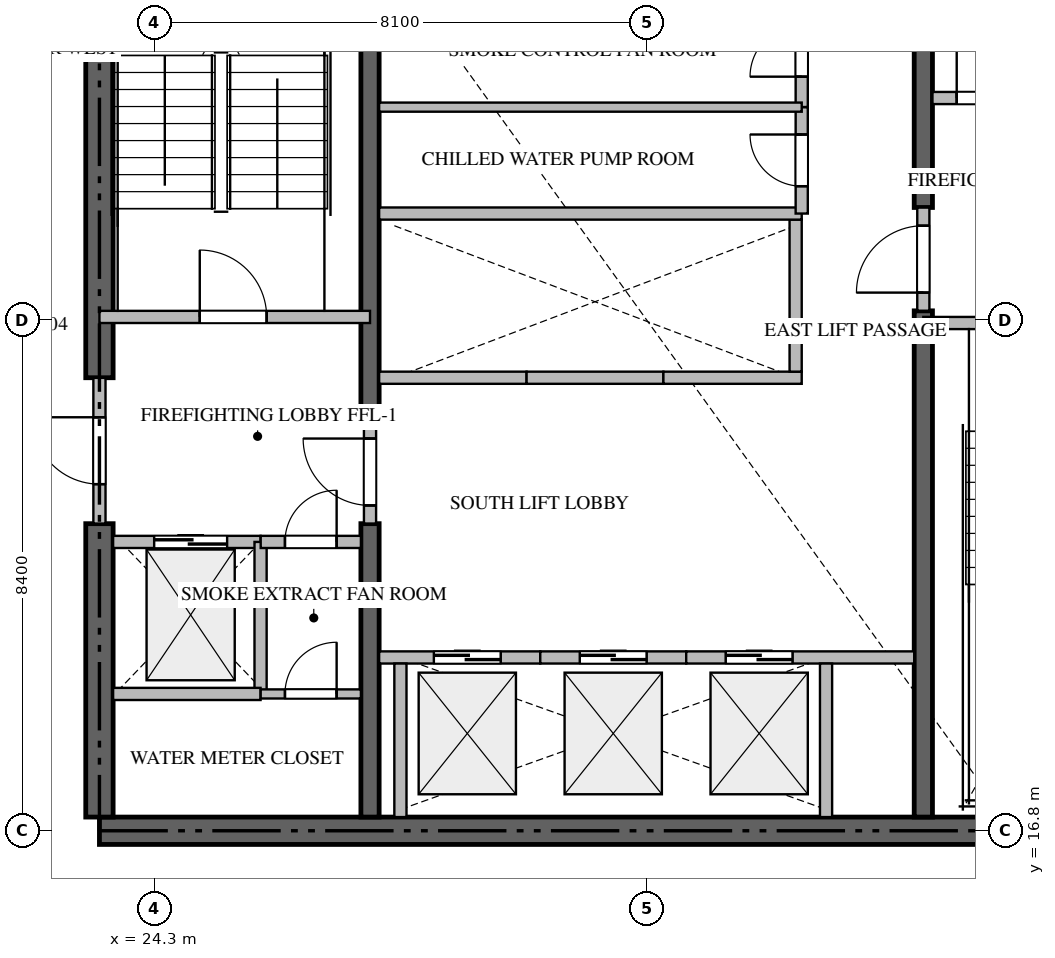
"""IFC4 building model, lengths in metres.
Left out: names, types, materials, properties, quantities, classifications, styles, units other than length and angle.
Written with IfcOpenShell. Run it as: python <this file> out.ifc"""

import sys

from ifc_helpers import new_model, si_unit, direction, frame, frame_2d, origin, place, context, subcontext, project, spatial, rectangle, extrude, source, transform, mapped, element, fill, save


model = new_model("IFC4")
c1 = context("Model", 3, precision=1e-05, world=origin(), true_north=direction((0.0, 1.0)))
c2 = subcontext(c1, "Body", "Model", "MODEL_VIEW")
j1 = project(units=[si_unit("LENGTHUNIT", "METRE"), si_unit("PLANEANGLEUNIT", "RADIAN")], contexts=[c1])
p1 = place(None, origin())
s1 = spatial("IfcSite", under=j1, at=p1, CompositionType="ELEMENT")
p2 = place(p1, origin())
s2 = spatial("IfcBuilding", under=s1, at=p2, CompositionType="ELEMENT")
p3 = place(p2, frame((0.0, 0.0, 94.2)))
s3 = spatial("IfcBuildingStorey", under=s2, at=p3, CompositionType="ELEMENT", Elevation=94.2)
p4 = place(p3, frame((23.4, 16.8, -0.26), z_axis=(0.0, 0.0, 1.0), x_axis=(1.0, 0.0, 0.0)))
e1 = element("IfcWall", 1, at=p4, inside=s3, PredefinedType="SHEAR", context=c2, shape_type="SweptSolid", body=[
    extrude(rectangle(XDim=18.0, YDim=0.45, at=frame_2d((9.0, 0.0))), origin(), (0.0, 0.0, 1.0), 3.748),
])
p5 = place(p3, frame((23.4, 17.025, -0.26), z_axis=(0.0, 0.0, 1.0), x_axis=(0.0, 1.0, 0.0)))
e2 = element("IfcWall", 2, at=p5, inside=s3, PredefinedType="SHEAR", context=c2, shape_type="SweptSolid", body=[
    extrude(rectangle(XDim=4.825, YDim=0.45, at=frame_2d((2.413, 0.0))), origin(), (0.0, 0.0, 1.0), 3.748),
])
p6 = place(p3, frame((23.4, 24.25, -0.26), z_axis=(0.0, 0.0, 1.0), x_axis=(0.0, 1.0, 0.0)))
e3 = element("IfcWall", 3, at=p6, inside=s3, PredefinedType="SHEAR", context=c2, shape_type="SweptSolid", body=[
    extrude(rectangle(XDim=9.125, YDim=0.45, at=frame_2d((4.562, 0.0))), origin(), (0.0, 0.0, 1.0), 3.748),
])
p7 = place(p3, frame((27.85, 17.025, -0.26), z_axis=(0.0, 0.0, 1.0), x_axis=(0.0, 1.0, 0.0)))
e4 = element("IfcWall", 4, at=p7, inside=s3, PredefinedType="SHEAR", context=c2, shape_type="SweptSolid", body=[
    extrude(rectangle(XDim=4.825, YDim=0.3, at=frame_2d((2.413, 0.0))), origin(), (0.0, 0.0, 1.0), 3.748),
])
p8 = place(p3, frame((27.85, 23.55, -0.26), z_axis=(0.0, 0.0, 1.0), x_axis=(0.0, 1.0, 0.0)))
e5 = element("IfcWall", 5, at=p8, inside=s3, PredefinedType="SHEAR", context=c2, shape_type="SweptSolid", body=[
    extrude(rectangle(XDim=9.825, YDim=0.3, at=frame_2d((4.913, 0.0))), origin(), (0.0, 0.0, 1.0), 3.748),
])
p9 = place(p3, frame((36.95, 17.025, -0.26), z_axis=(0.0, 0.0, 1.0), x_axis=(0.0, 1.0, 0.0)))
e6 = element("IfcWall", 6, at=p9, inside=s3, PredefinedType="SHEAR", context=c2, shape_type="SweptSolid", body=[
    extrude(rectangle(XDim=8.325, YDim=0.3, at=frame_2d((4.163, 0.0))), origin(), (0.0, 0.0, 1.0), 3.748),
])
p10 = place(p3, frame((36.95, 27.05, -0.26), z_axis=(0.0, 0.0, 1.0), x_axis=(0.0, 1.0, 0.0)))
e7 = element("IfcWall", 7, at=p10, inside=s3, PredefinedType="SHEAR", context=c2, shape_type="SweptSolid", body=[
    extrude(rectangle(XDim=6.325, YDim=0.3, at=frame_2d((3.163, 0.0))), origin(), (0.0, 0.0, 1.0), 3.748),
])
p11 = place(p3, frame((23.4, 25.25, 0.0), z_axis=(0.0, 0.0, 1.0), x_axis=(1.0, 0.0, 0.0)))
e8 = element("IfcWall", 8, at=p11, inside=s3, PredefinedType="STANDARD", context=c2, shape_type="SweptSolid", body=[
    extrude(rectangle(XDim=4.45, YDim=0.2, at=frame_2d((2.225, 0.0))), origin(), (0.0, 0.0, 1.0), 3.49),
])
p12 = place(p11, frame((1.65, 0.0, 0.0)))
e9 = element("IfcOpeningElement", 9, at=p12, cuts=e8, PredefinedType="OPENING", context=c2, shape_type="SweptSolid", body=[
    extrude(rectangle(XDim=1.1, YDim=2.15, at=frame_2d((0.55, 1.075))), frame((0.0, 0.11, 0.0), z_axis=(0.0, -1.0, 0.0), x_axis=(1.0, 0.0, 0.0)), (0.0, 0.0, 1.0), 0.22),
])
p13 = place(p3, frame((36.95, 25.15, 0.0), z_axis=(0.0, 0.0, 1.0), x_axis=(1.0, 0.0, 0.0)))
e10 = element("IfcWall", 10, at=p13, inside=s3, PredefinedType="STANDARD", context=c2, shape_type="SweptSolid", body=[
    extrude(rectangle(XDim=4.45, YDim=0.2, at=frame_2d((2.225, 0.0))), origin(), (0.0, 0.0, 1.0), 3.49),
])
p14 = place(p13, frame((1.65, 0.0, 0.0)))
e11 = element("IfcOpeningElement", 11, at=p14, cuts=e10, PredefinedType="OPENING", context=c2, shape_type="SweptSolid", body=[
    extrude(rectangle(XDim=1.1, YDim=2.15, at=frame_2d((0.55, 1.075))), frame((0.0, 0.11, 0.0), z_axis=(0.0, -1.0, 0.0), x_axis=(1.0, 0.0, 0.0)), (0.0, 0.0, 1.0), 0.22),
])
p15 = place(p3, frame((23.625, 21.55, 0.0), z_axis=(0.0, 0.0, 1.0), x_axis=(1.0, 0.0, 0.0)))
e12 = element("IfcWall", 12, at=p15, inside=s3, PredefinedType="STANDARD", context=c2, shape_type="SweptSolid", body=[
    extrude(rectangle(XDim=2.425, YDim=0.2, at=frame_2d((1.212, 0.0))), origin(), (0.0, 0.0, 1.0), 3.49),
])
p16 = place(p15, frame((0.675, 0.0, 0.0)))
e13 = element("IfcOpeningElement", 13, at=p16, cuts=e12, PredefinedType="OPENING", context=c2, shape_type="SweptSolid", body=[
    extrude(rectangle(XDim=1.2, YDim=2.2, at=frame_2d((0.6, 1.1))), frame((0.0, 0.11, 0.0), z_axis=(0.0, -1.0, 0.0), x_axis=(1.0, 0.0, 0.0)), (0.0, 0.0, 1.0), 0.22),
])
p17 = place(p3, frame((28.0, 19.65, 0.0), z_axis=(0.0, 0.0, 1.0), x_axis=(1.0, 0.0, 0.0)))
e14 = element("IfcWall", 14, at=p17, inside=s3, PredefinedType="STANDARD", context=c2, shape_type="SweptSolid", body=[
    extrude(rectangle(XDim=2.65, YDim=0.2, at=frame_2d((1.325, 0.0))), origin(), (0.0, 0.0, 1.0), 3.49),
])
p18 = place(p17, frame((0.9, 0.0, 0.0)))
e15 = element("IfcOpeningElement", 15, at=p18, cuts=e14, PredefinedType="OPENING", context=c2, shape_type="SweptSolid", body=[
    extrude(rectangle(XDim=1.1, YDim=2.2, at=frame_2d((0.55, 1.1))), frame((0.0, 0.11, 0.0), z_axis=(0.0, -1.0, 0.0), x_axis=(1.0, 0.0, 0.0)), (0.0, 0.0, 1.0), 0.22),
])
p19 = place(p3, frame((28.35, 17.025, 0.0), z_axis=(0.0, 0.0, 1.0), x_axis=(0.0, 1.0, 0.0)))
e16 = element("IfcWall", 16, at=p19, inside=s3, PredefinedType="STANDARD", context=c2, shape_type="SweptSolid", body=[
    extrude(rectangle(XDim=2.525, YDim=0.2, at=frame_2d((1.263, 0.0))), origin(), (0.0, 0.0, 1.0), 3.49),
])
p20 = place(p3, frame((30.65, 19.65, 0.0), z_axis=(0.0, 0.0, 1.0), x_axis=(1.0, 0.0, 0.0)))
e17 = element("IfcWall", 17, at=p20, inside=s3, PredefinedType="STANDARD", context=c2, shape_type="SweptSolid", body=[
    extrude(rectangle(XDim=2.4, YDim=0.2, at=frame_2d((1.2, 0.0))), origin(), (0.0, 0.0, 1.0), 3.49),
])
p21 = place(p20, frame((0.65, 0.0, 0.0)))
e18 = element("IfcOpeningElement", 18, at=p21, cuts=e17, PredefinedType="OPENING", context=c2, shape_type="SweptSolid", body=[
    extrude(rectangle(XDim=1.1, YDim=2.2, at=frame_2d((0.55, 1.1))), frame((0.0, 0.11, 0.0), z_axis=(0.0, -1.0, 0.0), x_axis=(1.0, 0.0, 0.0)), (0.0, 0.0, 1.0), 0.22),
])
p22 = place(p3, frame((33.05, 19.65, 0.0), z_axis=(0.0, 0.0, 1.0), x_axis=(1.0, 0.0, 0.0)))
e19 = element("IfcWall", 19, at=p22, inside=s3, PredefinedType="STANDARD", context=c2, shape_type="SweptSolid", body=[
    extrude(rectangle(XDim=3.75, YDim=0.2, at=frame_2d((1.875, 0.0))), origin(), (0.0, 0.0, 1.0), 3.49),
])
p23 = place(p22, frame((0.65, 0.0, 0.0)))
e20 = element("IfcOpeningElement", 20, at=p23, cuts=e19, PredefinedType="OPENING", context=c2, shape_type="SweptSolid", body=[
    extrude(rectangle(XDim=1.1, YDim=2.2, at=frame_2d((0.55, 1.1))), frame((0.0, 0.11, 0.0), z_axis=(0.0, -1.0, 0.0), x_axis=(1.0, 0.0, 0.0)), (0.0, 0.0, 1.0), 0.22),
])
p24 = place(p3, frame((35.35, 17.025, 0.0), z_axis=(0.0, 0.0, 1.0), x_axis=(0.0, 1.0, 0.0)))
e21 = element("IfcWall", 21, at=p24, inside=s3, PredefinedType="STANDARD", context=c2, shape_type="SweptSolid", body=[
    extrude(rectangle(XDim=2.525, YDim=0.2, at=frame_2d((1.263, 0.0))), origin(), (0.0, 0.0, 1.0), 3.49),
])
p25 = place(p3, frame((28.0, 24.25, 0.0), z_axis=(0.0, 0.0, 1.0), x_axis=(1.0, 0.0, 0.0)))
e22 = element("IfcWall", 22, at=p25, inside=s3, PredefinedType="STANDARD", context=c2, shape_type="SweptSolid", body=[
    extrude(rectangle(XDim=2.425, YDim=0.2, at=frame_2d((1.212, 0.0))), origin(), (0.0, 0.0, 1.0), 3.49),
])
p26 = place(p3, frame((30.425, 24.25, 0.0), z_axis=(0.0, 0.0, 1.0), x_axis=(1.0, 0.0, 0.0)))
e23 = element("IfcWall", 23, at=p26, inside=s3, PredefinedType="STANDARD", context=c2, shape_type="SweptSolid", body=[
    extrude(rectangle(XDim=2.25, YDim=0.2, at=frame_2d((1.125, 0.0))), origin(), (0.0, 0.0, 1.0), 3.49),
])
p27 = place(p3, frame((32.675, 24.25, 0.0), z_axis=(0.0, 0.0, 1.0), x_axis=(1.0, 0.0, 0.0)))
e24 = element("IfcWall", 24, at=p27, inside=s3, PredefinedType="STANDARD", context=c2, shape_type="SweptSolid", body=[
    extrude(rectangle(XDim=2.275, YDim=0.2, at=frame_2d((1.137, 0.0))), origin(), (0.0, 0.0, 1.0), 3.49),
])
for number, where, z_axis, x_axis in (
    (25, (34.85, 24.35, 0.0), (0.0, 0.0, 1.0), (0.0, 1.0, 0.0)),
    (26, (26.05, 19.05, 0.0), (0.0, 0.0, 1.0), (0.0, 1.0, 0.0)),
):
    element("IfcWall", number, at=place(p3, frame(where, z_axis=z_axis, x_axis=x_axis)), inside=s3, PredefinedType="STANDARD", context=c2, shape_type="SweptSolid", body=[
        extrude(rectangle(XDim=2.5, YDim=0.2, at=frame_2d((1.25, 0.0))), origin(), (0.0, 0.0, 1.0), 3.49),
    ])
p28 = place(p3, frame((23.625, 19.05, 0.0), z_axis=(0.0, 0.0, 1.0), x_axis=(1.0, 0.0, 0.0)))
e27 = element("IfcWall", 27, at=p28, inside=s3, PredefinedType="STANDARD", context=c2, shape_type="SweptSolid", body=[
    extrude(rectangle(XDim=2.425, YDim=0.2, at=frame_2d((1.212, 0.0))), origin(), (0.0, 0.0, 1.0), 3.49),
])
p29 = place(p3, frame((26.052, 21.55, 0.0), z_axis=(0.0, 0.0, 1.0), x_axis=(1.0, 0.0, 0.0)))
e28 = element("IfcWall", 28, at=p29, inside=s3, PredefinedType="STANDARD", context=c2, shape_type="SweptSolid", body=[
    extrude(rectangle(XDim=1.648, YDim=0.2, at=frame_2d((0.824, 0.0))), origin(), (0.0, 0.0, 1.0), 3.49),
])
p30 = place(p29, frame((0.399, 0.0, 0.0)))
e29 = element("IfcOpeningElement", 29, at=p30, cuts=e28, PredefinedType="OPENING", context=c2, shape_type="SweptSolid", body=[
    extrude(rectangle(XDim=0.85, YDim=2.1, at=frame_2d((0.425, 1.05))), frame((0.0, 0.11, 0.0), z_axis=(0.0, -1.0, 0.0), x_axis=(1.0, 0.0, 0.0)), (0.0, 0.0, 1.0), 0.22),
])
p31 = place(p3, frame((37.1, 28.85, 0.0), z_axis=(0.0, 0.0, 1.0), x_axis=(1.0, 0.0, 0.0)))
e30 = element("IfcWall", 30, at=p31, inside=s3, PredefinedType="STANDARD", context=c2, shape_type="SweptSolid", body=[
    extrude(rectangle(XDim=1.648, YDim=0.2, at=frame_2d((0.824, 0.0))), origin(), (0.0, 0.0, 1.0), 3.49),
])
p32 = place(p31, frame((0.399, 0.0, 0.0)))
e31 = element("IfcOpeningElement", 31, at=p32, cuts=e30, PredefinedType="OPENING", context=c2, shape_type="SweptSolid", body=[
    extrude(rectangle(XDim=0.85, YDim=2.1, at=frame_2d((0.425, 1.05))), frame((0.0, 0.11, 0.0), z_axis=(0.0, -1.0, 0.0), x_axis=(1.0, 0.0, 0.0)), (0.0, 0.0, 1.0), 0.22),
])
p33 = place(p3, frame((23.4, 21.852, 0.0), z_axis=(0.0, 0.0, 1.0), x_axis=(0.0, 1.0, 0.0)))
e32 = element("IfcWall", 32, at=p33, inside=s3, PredefinedType="STANDARD", context=c2, shape_type="SweptSolid", body=[
    extrude(rectangle(XDim=2.396, YDim=0.2, at=frame_2d((1.198, 0.0))), origin(), (0.0, 0.0, 1.0), 3.49),
])
p34 = place(p33, frame((0.648, 0.0, 0.0)))
e33 = element("IfcOpeningElement", 33, at=p34, cuts=e32, PredefinedType="OPENING", context=c2, shape_type="SweptSolid", body=[
    extrude(rectangle(XDim=1.1, YDim=2.15, at=frame_2d((0.55, 1.075))), frame((0.0, 0.11, 0.0), z_axis=(0.0, -1.0, 0.0), x_axis=(1.0, 0.0, 0.0)), (0.0, 0.0, 1.0), 0.22),
])
p35 = place(p3, frame((27.85, 21.852, 0.0), z_axis=(0.0, 0.0, 1.0), x_axis=(0.0, 1.0, 0.0)))
e34 = element("IfcWall", 34, at=p35, inside=s3, PredefinedType="STANDARD", context=c2, shape_type="SweptSolid", body=[
    extrude(rectangle(XDim=1.696, YDim=0.2, at=frame_2d((0.848, 0.0))), origin(), (0.0, 0.0, 1.0), 3.49),
])
p36 = place(p35, frame((0.298, 0.0, 0.0)))
e35 = element("IfcOpeningElement", 35, at=p36, cuts=e34, PredefinedType="OPENING", context=c2, shape_type="SweptSolid", body=[
    extrude(rectangle(XDim=1.1, YDim=2.15, at=frame_2d((0.55, 1.075))), frame((0.0, 0.11, 0.0), z_axis=(0.0, -1.0, 0.0), x_axis=(1.0, 0.0, 0.0)), (0.0, 0.0, 1.0), 0.22),
])
p37 = place(p3, frame((36.95, 25.352, 0.0), z_axis=(0.0, 0.0, 1.0), x_axis=(0.0, 1.0, 0.0)))
e36 = element("IfcWall", 36, at=p37, inside=s3, PredefinedType="STANDARD", context=c2, shape_type="SweptSolid", body=[
    extrude(rectangle(XDim=1.696, YDim=0.2, at=frame_2d((0.848, 0.0))), origin(), (0.0, 0.0, 1.0), 3.49),
])
p38 = place(p37, frame((0.298, 0.0, 0.0)))
e37 = element("IfcOpeningElement", 37, at=p38, cuts=e36, PredefinedType="OPENING", context=c2, shape_type="SweptSolid", body=[
    extrude(rectangle(XDim=1.1, YDim=2.15, at=frame_2d((0.55, 1.075))), frame((0.0, 0.11, 0.0), z_axis=(0.0, -1.0, 0.0), x_axis=(1.0, 0.0, 0.0)), (0.0, 0.0, 1.0), 0.22),
])
p39 = place(p3, frame((28.0, 26.95, 0.0), z_axis=(0.0, 0.0, 1.0), x_axis=(1.0, 0.0, 0.0)))
e38 = element("IfcWall", 38, at=p39, inside=s3, PredefinedType="STANDARD", context=c2, shape_type="SweptSolid", body=[
    extrude(rectangle(XDim=6.95, YDim=0.2, at=frame_2d((3.475, 0.0))), origin(), (0.0, 0.0, 1.0), 3.49),
])
p40 = place(p3, frame((26.052, 19.05, 0.0), z_axis=(0.0, 0.0, 1.0), x_axis=(1.0, 0.0, 0.0)))
e39 = element("IfcWall", 39, at=p40, inside=s3, PredefinedType="PARTITIONING", context=c2, shape_type="SweptSolid", body=[
    extrude(rectangle(XDim=1.648, YDim=0.15, at=frame_2d((0.824, 0.0))), origin(), (0.0, 0.0, 1.0), 3.49),
])
p41 = place(p40, frame((0.399, 0.0, 0.0)))
e40 = element("IfcOpeningElement", 40, at=p41, cuts=e39, PredefinedType="OPENING", context=c2, shape_type="SweptSolid", body=[
    extrude(rectangle(XDim=0.85, YDim=2.1, at=frame_2d((0.425, 1.05))), frame((0.0, 0.085, 0.0), z_axis=(0.0, -1.0, 0.0), x_axis=(1.0, 0.0, 0.0)), (0.0, 0.0, 1.0), 0.17),
])
p42 = place(p3, frame((34.95, 26.95, 0.0), z_axis=(0.0, 0.0, 1.0), x_axis=(0.0, 1.0, 0.0)))
e41 = element("IfcWall", 41, at=p42, inside=s3, PredefinedType="STANDARD", context=c2, shape_type="SweptSolid", body=[
    extrude(rectangle(XDim=1.75, YDim=0.2, at=frame_2d((0.875, 0.0))), origin(), (0.0, 0.0, 1.0), 3.49),
])
p43 = place(p42, frame((0.45, 0.0, 0.0)))
e42 = element("IfcOpeningElement", 42, at=p43, cuts=e41, PredefinedType="OPENING", context=c2, shape_type="SweptSolid", body=[
    extrude(rectangle(XDim=0.85, YDim=2.1, at=frame_2d((0.425, 1.05))), frame((0.0, 0.11, 0.0), z_axis=(0.0, -1.0, 0.0), x_axis=(1.0, 0.0, 0.0)), (0.0, 0.0, 1.0), 0.22),
])
p44 = place(p3, frame((34.95, 28.702, 0.0), z_axis=(0.0, 0.0, 1.0), x_axis=(0.0, 1.0, 0.0)))
e43 = element("IfcWall", 43, at=p44, inside=s3, PredefinedType="STANDARD", context=c2, shape_type="SweptSolid", body=[
    extrude(rectangle(XDim=1.848, YDim=0.2, at=frame_2d((0.924, 0.0))), origin(), (0.0, 0.0, 1.0), 3.49),
])
p45 = place(p44, frame((0.499, 0.0, 0.0)))
e44 = element("IfcOpeningElement", 44, at=p45, cuts=e43, PredefinedType="OPENING", context=c2, shape_type="SweptSolid", body=[
    extrude(rectangle(XDim=0.85, YDim=2.1, at=frame_2d((0.425, 1.05))), frame((0.0, 0.11, 0.0), z_axis=(0.0, -1.0, 0.0), x_axis=(1.0, 0.0, 0.0)), (0.0, 0.0, 1.0), 0.22),
])
p46 = place(p3, frame((28.0, 28.7, 0.0), z_axis=(0.0, 0.0, 1.0), x_axis=(1.0, 0.0, 0.0)))
e45 = element("IfcWall", 45, at=p46, inside=s3, PredefinedType="PARTITIONING", context=c2, shape_type="SweptSolid", body=[
    extrude(rectangle(XDim=6.95, YDim=0.15, at=frame_2d((3.475, 0.0))), origin(), (0.0, 0.0, 1.0), 3.49),
])
m1 = source(origin(), c2, "Body", "SweptSolid", [
    extrude(rectangle(XDim=1.1, YDim=2.15, at=frame_2d((0.55, 1.075))), frame((0.0, 0.025, 0.0), z_axis=(0.0, -1.0, 0.0), x_axis=(1.0, 0.0, 0.0)), (0.0, 0.0, 1.0), 0.05),
])
p47 = place(p12, origin())
e46 = element("IfcDoor", 46, at=p47, inside=s3, OperationType="SINGLE_SWING_LEFT", PredefinedType="DOOR", context=c2, shape_type="MappedRepresentation", body=[
    mapped(m1, transform((0.0, 0.0, 0.0), scale=1.0)),
])
fill(e9, e46)
m2 = source(origin(), c2, "Body", "SweptSolid", [
    extrude(rectangle(XDim=1.2, YDim=2.2, at=frame_2d((0.6, 1.1))), frame((0.0, 0.025, 0.0), z_axis=(0.0, -1.0, 0.0), x_axis=(1.0, 0.0, 0.0)), (0.0, 0.0, 1.0), 0.05),
])
p48 = place(p16, origin())
e47 = element("IfcDoor", 47, at=p48, inside=s3, OperationType="DOUBLE_DOOR_SLIDING", PredefinedType="DOOR", context=c2, shape_type="MappedRepresentation", body=[
    mapped(m2, transform((0.0, 0.0, 0.0), scale=1.0)),
])
fill(e13, e47)
m3 = source(origin(), c2, "Body", "SweptSolid", [
    extrude(rectangle(XDim=1.1, YDim=2.2, at=frame_2d((0.55, 1.1))), frame((0.0, 0.025, 0.0), z_axis=(0.0, -1.0, 0.0), x_axis=(1.0, 0.0, 0.0)), (0.0, 0.0, 1.0), 0.05),
])
p49 = place(p18, origin())
e48 = element("IfcDoor", 48, at=p49, inside=s3, OperationType="DOUBLE_DOOR_SLIDING", PredefinedType="DOOR", context=c2, shape_type="MappedRepresentation", body=[
    mapped(m3, transform((0.0, 0.0, 0.0), scale=1.0)),
])
fill(e15, e48)
p50 = place(p21, origin())
e49 = element("IfcDoor", 49, at=p50, inside=s3, OperationType="DOUBLE_DOOR_SLIDING", PredefinedType="DOOR", context=c2, shape_type="MappedRepresentation", body=[
    mapped(m3, transform((0.0, 0.0, 0.0), scale=1.0)),
])
fill(e18, e49)
p51 = place(p23, origin())
e50 = element("IfcDoor", 50, at=p51, inside=s3, OperationType="DOUBLE_DOOR_SLIDING", PredefinedType="DOOR", context=c2, shape_type="MappedRepresentation", body=[
    mapped(m3, transform((0.0, 0.0, 0.0), scale=1.0)),
])
fill(e20, e50)
m4 = source(origin(), c2, "Body", "SweptSolid", [
    extrude(rectangle(XDim=0.85, YDim=2.1, at=frame_2d((0.425, 1.05))), frame((0.0, 0.025, 0.0), z_axis=(0.0, -1.0, 0.0), x_axis=(1.0, 0.0, 0.0)), (0.0, 0.0, 1.0), 0.05),
])
p52 = place(p30, origin())
e51 = element("IfcDoor", 51, at=p52, inside=s3, OperationType="SINGLE_SWING_RIGHT", PredefinedType="DOOR", context=c2, shape_type="MappedRepresentation", body=[
    mapped(m4, transform((0.0, 0.0, 0.0), scale=1.0)),
])
fill(e29, e51)
p53 = place(p32, origin())
e52 = element("IfcDoor", 52, at=p53, inside=s3, OperationType="SINGLE_SWING_LEFT", PredefinedType="DOOR", context=c2, shape_type="MappedRepresentation", body=[
    mapped(m4, transform((0.0, 0.0, 0.0), scale=1.0)),
])
fill(e31, e52)
p54 = place(p34, origin())
e53 = element("IfcDoor", 53, at=p54, inside=s3, OperationType="SINGLE_SWING_RIGHT", PredefinedType="DOOR", context=c2, shape_type="MappedRepresentation", body=[
    mapped(m1, transform((0.0, 0.0, 0.0), scale=1.0)),
])
fill(e33, e53)
p55 = place(p36, origin())
e54 = element("IfcDoor", 54, at=p55, inside=s3, OperationType="SINGLE_SWING_RIGHT", PredefinedType="DOOR", context=c2, shape_type="MappedRepresentation", body=[
    mapped(m1, transform((0.0, 0.0, 0.0), scale=1.0)),
])
fill(e35, e54)
p56 = place(p38, origin())
e55 = element("IfcDoor", 55, at=p56, inside=s3, OperationType="SINGLE_SWING_LEFT", PredefinedType="DOOR", context=c2, shape_type="MappedRepresentation", body=[
    mapped(m1, transform((0.0, 0.0, 0.0), scale=1.0)),
])
fill(e37, e55)
p57 = place(p41, origin())
e56 = element("IfcDoor", 56, at=p57, inside=s3, OperationType="SINGLE_SWING_RIGHT", PredefinedType="DOOR", context=c2, shape_type="MappedRepresentation", body=[
    mapped(m4, transform((0.0, 0.0, 0.0), scale=1.0)),
])
fill(e40, e56)
p58 = place(p43, origin())
e57 = element("IfcDoor", 57, at=p58, inside=s3, OperationType="SINGLE_SWING_RIGHT", PredefinedType="DOOR", context=c2, shape_type="MappedRepresentation", body=[
    mapped(m4, transform((0.0, 0.0, 0.0), scale=1.0)),
])
fill(e42, e57)
p59 = place(p45, origin())
e58 = element("IfcDoor", 58, at=p59, inside=s3, OperationType="SINGLE_SWING_LEFT", PredefinedType="DOOR", context=c2, shape_type="MappedRepresentation", body=[
    mapped(m4, transform((0.0, 0.0, 0.0), scale=1.0)),
])
fill(e44, e58)
save(model, sys.argv[1])
